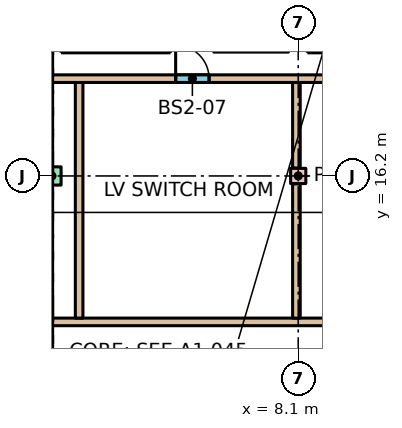
"""IFC4 building model, lengths in metres.
Left out: names, types, materials, properties, quantities, classifications, styles, units other than length and angle.
Written with IfcOpenShell. Run it as: python <this file> out.ifc"""

import sys

from ifc_helpers import new_model, si_unit, direction, frame, frame_2d, origin, origin_2d, place, context, subcontext, project, spatial, rectangle, extrude, element, fill, save


model = new_model("IFC4")
c1 = context("Model", 3, precision=1e-05, world=origin(), true_north=direction((0.0, 1.0)))
c2 = subcontext(c1, "Body", "Model", "MODEL_VIEW")
j1 = project(units=[si_unit("LENGTHUNIT", "METRE"), si_unit("PLANEANGLEUNIT", "RADIAN")], contexts=[c1])
p1 = place(None, origin())
s1 = spatial("IfcSite", under=j1, at=p1, CompositionType="ELEMENT")
p2 = place(p1, origin())
s2 = spatial("IfcBuilding", under=s1, at=p2, CompositionType="ELEMENT")
p3 = place(p2, frame((0.0, 0.0, -7.2)))
s3 = spatial("IfcBuildingStorey", under=s2, at=p3, CompositionType="ELEMENT", Elevation=-7.2)
p4 = place(p3, frame((0.0, 16.2, 0.0), z_axis=(0.0, 0.0, 1.0), x_axis=(1.0, 0.0, 0.0)))
e1 = element("IfcColumn", 1, at=p4, inside=s3, PredefinedType="COLUMN", context=c2, shape_type="SweptSolid", body=[
    extrude(rectangle(XDim=0.6, YDim=0.6, at=origin_2d()), origin(), (0.0, 0.0, 1.0), 3.6),
])
p5 = place(p3, frame((8.1, 16.2, 0.0), z_axis=(0.0, 0.0, 1.0), x_axis=(1.0, 0.0, 0.0)))
e2 = element("IfcColumn", 2, at=p5, inside=s3, PredefinedType="COLUMN", context=c2, shape_type="SweptSolid", body=[
    extrude(rectangle(XDim=0.5, YDim=0.5, at=origin_2d()), origin(), (0.0, 0.0, 1.0), 3.6),
])
p6 = place(p3, frame((-13.275, 11.4, 0.0), z_axis=(0.0, 0.0, 1.0), x_axis=(1.0, 0.0, 0.0)))
e3 = element("IfcWall", 3, at=p6, inside=s3, PredefinedType="PARTITIONING", context=c2, shape_type="SweptSolid", body=[
    extrude(rectangle(XDim=34.55, YDim=0.25, at=frame_2d((17.275, 0.0))), origin(), (0.0, 0.0, 1.0), 3.28),
])
p7 = place(p3, frame((0.893, 11.525, 0.0), z_axis=(0.0, 0.0, 1.0), x_axis=(0.0, 1.0, 0.0)))
e4 = element("IfcWall", 4, at=p7, inside=s3, PredefinedType="PARTITIONING", context=c2, shape_type="SweptSolid", body=[
    extrude(rectangle(XDim=7.75, YDim=0.25, at=frame_2d((3.875, 0.0))), origin(), (0.0, 0.0, 1.0), 3.28),
])
p8 = place(p3, frame((8.04, 11.525, 0.0), z_axis=(0.0, 0.0, 1.0), x_axis=(0.0, 1.0, 0.0)))
e5 = element("IfcWall", 5, at=p8, inside=s3, PredefinedType="PARTITIONING", context=c2, shape_type="SweptSolid", body=[
    extrude(rectangle(XDim=4.415, YDim=0.25, at=frame_2d((2.208, 0.0))), origin(), (0.0, 0.0, 1.0), 3.28),
])
p9 = place(p3, frame((8.04, 16.46, 0.0), z_axis=(0.0, 0.0, 1.0), x_axis=(0.0, 1.0, 0.0)))
e6 = element("IfcWall", 6, at=p9, inside=s3, PredefinedType="PARTITIONING", context=c2, shape_type="SweptSolid", body=[
    extrude(rectangle(XDim=2.815, YDim=0.25, at=frame_2d((1.407, 0.0))), origin(), (0.0, 0.0, 1.0), 3.28),
])
p10 = place(p3, frame((-17.778, 19.4, 0.0), z_axis=(0.0, 0.0, 1.0), x_axis=(1.0, 0.0, 0.0)))
e7 = element("IfcWall", 7, at=p10, inside=s3, PredefinedType="PARTITIONING", context=c2, shape_type="SweptSolid", body=[
    extrude(rectangle(XDim=35.557, YDim=0.25, at=frame_2d((17.778, 0.0))), origin(), (0.0, 0.0, 1.0), 3.28),
])
p11 = place(p10, frame((7.553, 0.0, 0.0)))
e8 = element("IfcOpeningElement", 8, at=p11, cuts=e7, PredefinedType="OPENING", context=c2, shape_type="SweptSolid", body=[
    extrude(rectangle(XDim=1.1, YDim=2.1, at=frame_2d((0.55, 1.05))), frame((0.0, 0.135, 0.0), z_axis=(0.0, -1.0, 0.0), x_axis=(1.0, 0.0, 0.0)), (0.0, 0.0, 1.0), 0.27),
])
p12 = place(p10, frame((14.7, 0.0, 0.0)))
e9 = element("IfcOpeningElement", 9, at=p12, cuts=e7, PredefinedType="OPENING", context=c2, shape_type="SweptSolid", body=[
    extrude(rectangle(XDim=1.1, YDim=2.1, at=frame_2d((0.55, 1.05))), frame((0.0, 0.135, 0.0), z_axis=(0.0, -1.0, 0.0), x_axis=(1.0, 0.0, 0.0)), (0.0, 0.0, 1.0), 0.27),
])
p13 = place(p10, frame((21.847, 0.0, 0.0)))
e10 = element("IfcOpeningElement", 10, at=p13, cuts=e7, PredefinedType="OPENING", context=c2, shape_type="SweptSolid", body=[
    extrude(rectangle(XDim=1.1, YDim=2.1, at=frame_2d((0.55, 1.05))), frame((0.0, 0.135, 0.0), z_axis=(0.0, -1.0, 0.0), x_axis=(1.0, 0.0, 0.0)), (0.0, 0.0, 1.0), 0.27),
])
p14 = place(p10, frame((30.193, 0.0, 0.0)))
e11 = element("IfcOpeningElement", 11, at=p14, cuts=e7, PredefinedType="OPENING", context=c2, shape_type="SweptSolid", body=[
    extrude(rectangle(XDim=1.1, YDim=2.1, at=frame_2d((0.55, 1.05))), frame((0.0, 0.135, 0.0), z_axis=(0.0, -1.0, 0.0), x_axis=(1.0, 0.0, 0.0)), (0.0, 0.0, 1.0), 0.27),
])
p15 = place(p13, origin())
e12 = element("IfcDoor", 12, at=p15, inside=s3, OperationType="SINGLE_SWING_LEFT", PredefinedType="DOOR", context=c2, shape_type="SweptSolid", body=[
    extrude(rectangle(XDim=1.1, YDim=2.1, at=frame_2d((0.55, 1.05))), frame((0.0, 0.025, 0.0), z_axis=(0.0, -1.0, 0.0), x_axis=(1.0, 0.0, 0.0)), (0.0, 0.0, 1.0), 0.05),
])
fill(e10, e12)
save(model, sys.argv[1])
